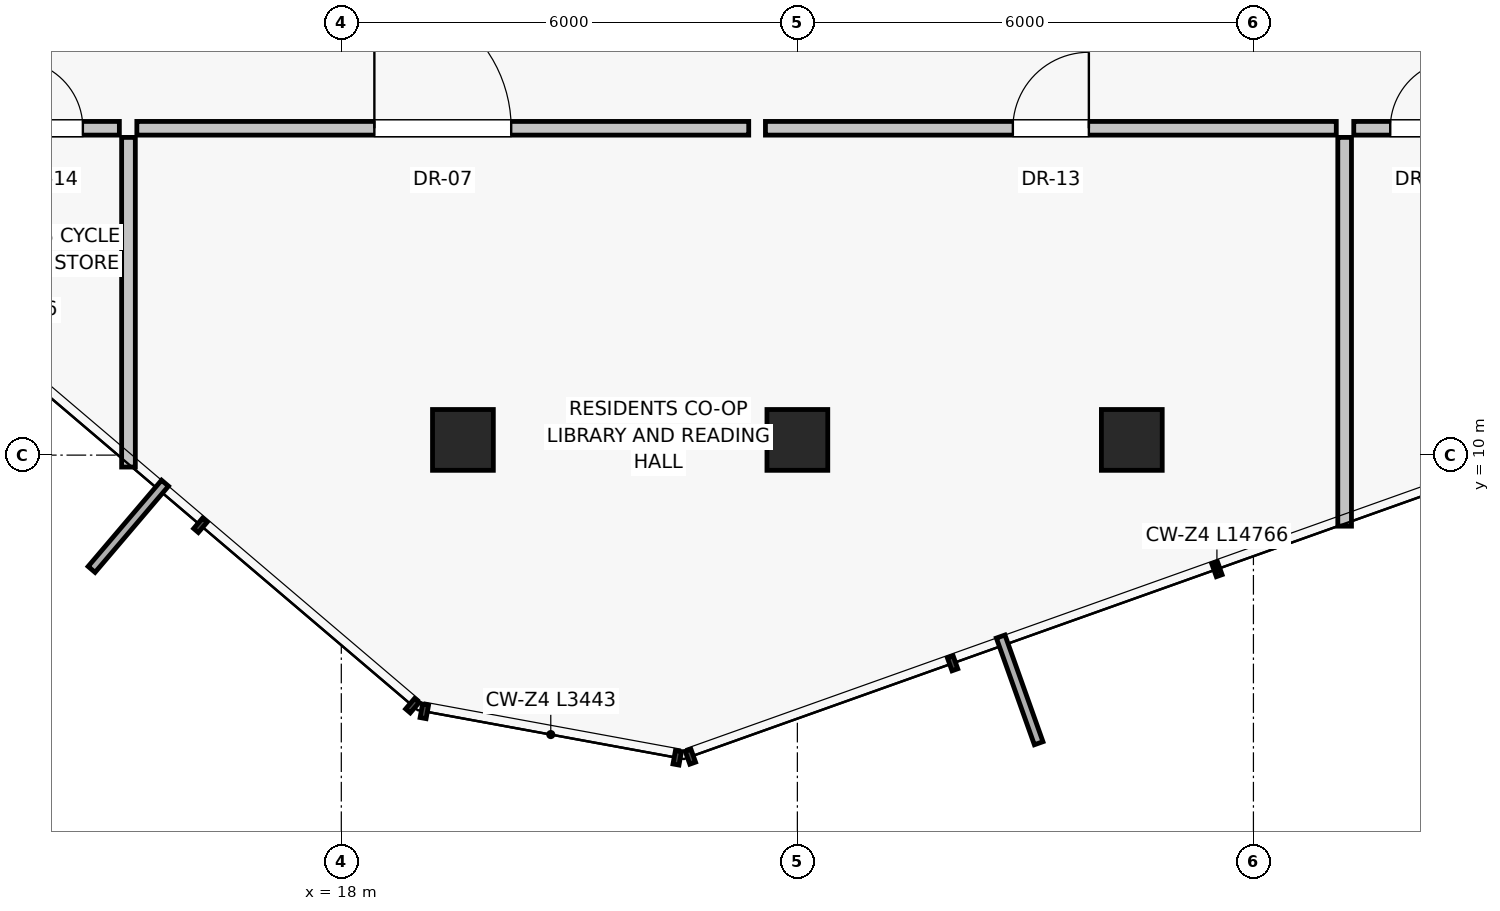
"""IFC4 building model, lengths in metres.
Left out: names, types, materials, properties, quantities, classifications, styles, units other than length and angle.
Written with IfcOpenShell. Run it as: python <this file> out.ifc"""

import sys

from ifc_helpers import new_model, si_unit, direction, frame, frame_2d, origin, origin_2d, place, context, subcontext, project, spatial, rectangle, extrude, source, transform, mapped, element, fill, save


model = new_model("IFC4")
c1 = context("Model", 3, precision=1e-05, world=origin(), true_north=direction((0.0, 1.0)))
c2 = subcontext(c1, "Body", "Model", "MODEL_VIEW")
j1 = project(units=[si_unit("LENGTHUNIT", "METRE"), si_unit("PLANEANGLEUNIT", "RADIAN")], contexts=[c1])
p1 = place(None, origin())
s1 = spatial("IfcSite", under=j1, at=p1, CompositionType="ELEMENT")
p2 = place(p1, origin())
s2 = spatial("IfcBuilding", under=s1, at=p2, CompositionType="ELEMENT")
p3 = place(p2, frame((0.0, 0.0, 244.75)))
s3 = spatial("IfcBuildingStorey", under=s2, at=p3, CompositionType="ELEMENT", Elevation=244.75)
for number, where, z_axis, x_axis in (
    (1, (19.6, 10.2, 0.0), (0.0, 0.0, 1.0), (1.0, 0.0, 0.0)),
    (2, (24.0, 10.2, 0.0), (0.0, 0.0, 1.0), (1.0, 0.0, 0.0)),
    (3, (28.4, 10.2, 0.0), (0.0, 0.0, 1.0), (1.0, 0.0, 0.0)),
):
    element("IfcColumn", number, at=place(p3, frame(where, z_axis=z_axis, x_axis=x_axis)), inside=s3, PredefinedType="COLUMN", context=c2, shape_type="SweptSolid", body=[
        extrude(rectangle(XDim=0.8, YDim=0.8, at=origin_2d()), origin(), (0.0, 0.0, 1.0), 3.25),
    ])
p4 = place(p3, frame((15.2, 14.18, 0.0), z_axis=(0.0, 0.0, 1.0), x_axis=(0.0, -1.0, 0.0)))
e4 = element("IfcWall", 4, at=p4, inside=s3, PredefinedType="PARTITIONING", context=c2, shape_type="SweptSolid", body=[
    extrude(rectangle(XDim=4.337, YDim=0.18, at=frame_2d((2.168, 0.0))), origin(), (0.0, 0.0, 1.0), 3.015),
])
p5 = place(p3, frame((31.2, 14.18, 0.0), z_axis=(0.0, 0.0, 1.0), x_axis=(0.0, -1.0, 0.0)))
e5 = element("IfcWall", 5, at=p5, inside=s3, PredefinedType="PARTITIONING", context=c2, shape_type="SweptSolid", body=[
    extrude(rectangle(XDim=5.115, YDim=0.18, at=frame_2d((2.557, 0.0))), origin(), (0.0, 0.0, 1.0), 3.015),
])
p6 = place(p3, frame((15.31, 14.3, 0.0), z_axis=(0.0, 0.0, 1.0), x_axis=(1.0, 0.0, 0.0)))
e6 = element("IfcWall", 6, at=p6, inside=s3, PredefinedType="PARTITIONING", context=c2, shape_type="SweptSolid", body=[
    extrude(rectangle(XDim=8.05, YDim=0.18, at=frame_2d((4.025, 0.0))), origin(), (0.0, 0.0, 1.0), 3.015),
])
p7 = place(p6, frame((3.125, 0.0, 0.0)))
e7 = element("IfcOpeningElement", 7, at=p7, cuts=e6, PredefinedType="OPENING", context=c2, shape_type="SweptSolid", body=[
    extrude(rectangle(XDim=1.8, YDim=2.25, at=frame_2d((0.9, 1.125))), frame((0.0, 0.1, 0.0), z_axis=(0.0, -1.0, 0.0), x_axis=(1.0, 0.0, 0.0)), (0.0, 0.0, 1.0), 0.2),
])
p8 = place(p3, frame((23.58, 14.3, 0.0), z_axis=(0.0, 0.0, 1.0), x_axis=(1.0, 0.0, 0.0)))
e8 = element("IfcWall", 8, at=p8, inside=s3, PredefinedType="PARTITIONING", context=c2, shape_type="SweptSolid", body=[
    extrude(rectangle(XDim=7.51, YDim=0.18, at=frame_2d((3.755, 0.0))), origin(), (0.0, 0.0, 1.0), 3.015),
])
p9 = place(p8, frame((3.255, 0.0, 0.0)))
e9 = element("IfcOpeningElement", 9, at=p9, cuts=e8, PredefinedType="OPENING", context=c2, shape_type="SweptSolid", body=[
    extrude(rectangle(XDim=1.0, YDim=2.01, at=frame_2d((0.5, 1.005))), frame((0.0, 0.1, 0.0), z_axis=(0.0, -1.0, 0.0), x_axis=(1.0, 0.0, 0.0)), (0.0, 0.0, 1.0), 0.2),
])
p10 = place(p3, frame((13.22, 14.3, 0.0), z_axis=(0.0, 0.0, 1.0), x_axis=(1.0, 0.0, 0.0)))
e10 = element("IfcWall", 10, at=p10, inside=s3, PredefinedType="PARTITIONING", context=c2, shape_type="SweptSolid", body=[
    extrude(rectangle(XDim=1.86, YDim=0.18, at=frame_2d((0.93, 0.0))), origin(), (0.0, 0.0, 1.0), 3.015),
])
p11 = place(p10, frame((0.48, 0.0, 0.0)))
e11 = element("IfcOpeningElement", 11, at=p11, cuts=e10, PredefinedType="OPENING", context=c2, shape_type="SweptSolid", body=[
    extrude(rectangle(XDim=0.9, YDim=2.01, at=frame_2d((0.45, 1.005))), frame((0.0, 0.1, 0.0), z_axis=(0.0, -1.0, 0.0), x_axis=(1.0, 0.0, 0.0)), (0.0, 0.0, 1.0), 0.2),
])
p12 = place(p3, frame((31.32, 14.3, 0.0), z_axis=(0.0, 0.0, 1.0), x_axis=(1.0, 0.0, 0.0)))
e12 = element("IfcWall", 12, at=p12, inside=s3, PredefinedType="PARTITIONING", context=c2, shape_type="SweptSolid", body=[
    extrude(rectangle(XDim=1.86, YDim=0.18, at=frame_2d((0.93, 0.0))), origin(), (0.0, 0.0, 1.0), 3.015),
])
p13 = place(p12, frame((0.48, 0.0, 0.0)))
e13 = element("IfcOpeningElement", 13, at=p13, cuts=e12, PredefinedType="OPENING", context=c2, shape_type="SweptSolid", body=[
    extrude(rectangle(XDim=0.9, YDim=2.01, at=frame_2d((0.45, 1.005))), frame((0.0, 0.1, 0.0), z_axis=(0.0, -1.0, 0.0), x_axis=(1.0, 0.0, 0.0)), (0.0, 0.0, 1.0), 0.2),
])
m1 = source(origin(), c2, "Body", "SweptSolid", [
    extrude(rectangle(XDim=1.8, YDim=2.25, at=frame_2d((0.9, 1.125))), frame((0.0, 0.025, 0.0), z_axis=(0.0, -1.0, 0.0), x_axis=(1.0, 0.0, 0.0)), (0.0, 0.0, 1.0), 0.05),
])
p14 = place(p7, origin())
e14 = element("IfcDoor", 14, at=p14, inside=s3, OperationType="SINGLE_SWING_LEFT", PredefinedType="DOOR", context=c2, shape_type="MappedRepresentation", body=[
    mapped(m1, transform((0.0, 0.0, 0.0), scale=1.0)),
])
fill(e7, e14)
m2 = source(origin(), c2, "Body", "SweptSolid", [
    extrude(rectangle(XDim=1.0, YDim=2.01, at=frame_2d((0.5, 1.005))), frame((0.0, 0.025, 0.0), z_axis=(0.0, -1.0, 0.0), x_axis=(1.0, 0.0, 0.0)), (0.0, 0.0, 1.0), 0.05),
])
p15 = place(p9, origin())
e15 = element("IfcDoor", 15, at=p15, inside=s3, OperationType="SINGLE_SWING_RIGHT", PredefinedType="DOOR", context=c2, shape_type="MappedRepresentation", body=[
    mapped(m2, transform((0.0, 0.0, 0.0), scale=1.0)),
])
fill(e9, e15)
m3 = source(origin(), c2, "Body", "SweptSolid", [
    extrude(rectangle(XDim=0.9, YDim=2.01, at=frame_2d((0.45, 1.005))), frame((0.0, 0.025, 0.0), z_axis=(0.0, -1.0, 0.0), x_axis=(1.0, 0.0, 0.0)), (0.0, 0.0, 1.0), 0.05),
])
p16 = place(p11, origin())
e16 = element("IfcDoor", 16, at=p16, inside=s3, OperationType="SINGLE_SWING_LEFT", PredefinedType="DOOR", context=c2, shape_type="MappedRepresentation", body=[
    mapped(m3, transform((0.0, 0.0, 0.0), scale=1.0)),
])
fill(e11, e16)
p17 = place(p13, origin())
e17 = element("IfcDoor", 17, at=p17, inside=s3, OperationType="SINGLE_SWING_RIGHT", PredefinedType="DOOR", context=c2, shape_type="MappedRepresentation", body=[
    mapped(m3, transform((0.0, 0.0, 0.0), scale=1.0)),
])
fill(e13, e17)
save(model, sys.argv[1])
